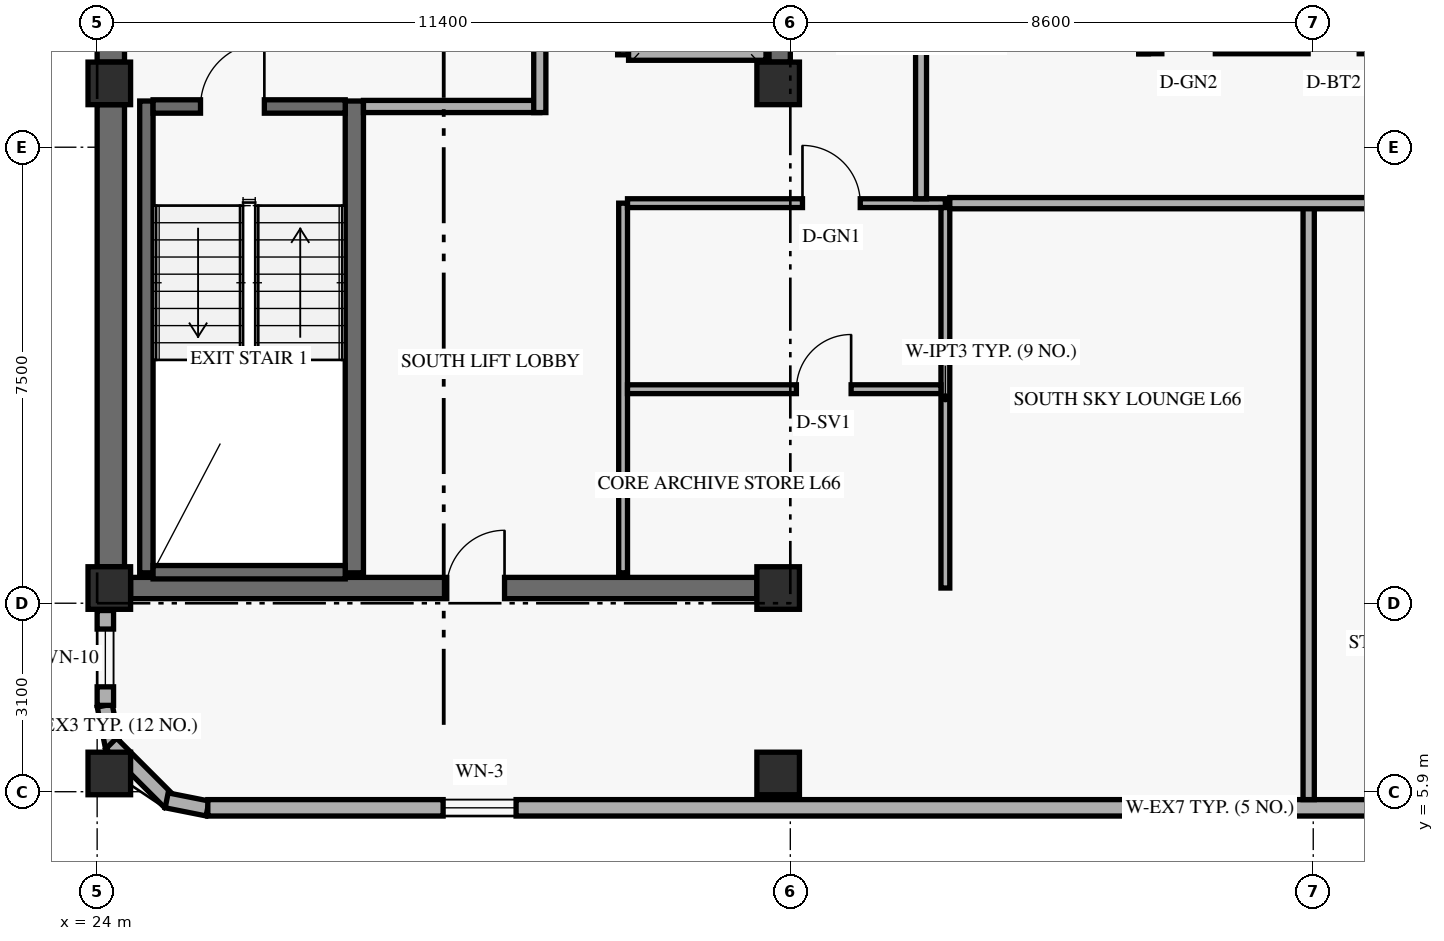
"""IFC4 building model, lengths in metres.
Left out: names, types, materials, properties, quantities, classifications, styles, units other than length and angle.
Written with IfcOpenShell. Run it as: python <this file> out.ifc"""

import sys

from ifc_helpers import new_model, si_unit, direction, frame, frame_2d, origin, origin_2d, place, context, subcontext, project, spatial, rectangle, extrude, element, fill, save


model = new_model("IFC4")
c1 = context("Model", 3, precision=1e-05, world=origin(), true_north=direction((0.0, 1.0)))
c2 = subcontext(c1, "Body", "Model", "MODEL_VIEW")
j1 = project(units=[si_unit("LENGTHUNIT", "METRE"), si_unit("PLANEANGLEUNIT", "RADIAN")], contexts=[c1])
p1 = place(None, origin())
s1 = spatial("IfcSite", under=j1, at=p1, CompositionType="ELEMENT")
p2 = place(p1, origin())
s2 = spatial("IfcBuilding", under=s1, at=p2, CompositionType="ELEMENT")
p3 = place(p2, frame((0.0, 0.0, 253.2)))
s3 = spatial("IfcBuildingStorey", under=s2, at=p3, CompositionType="ELEMENT", Elevation=253.2)
p4 = place(p3, frame((24.225, 9.6, 0.0), z_axis=(0.0, 0.0, 1.0), x_axis=(0.0, 1.0, 0.0)))
e1 = element("IfcWall", 1, at=p4, inside=s3, PredefinedType="SHEAR", context=c2, shape_type="SweptSolid", body=[
    extrude(rectangle(XDim=7.6, YDim=0.45, at=frame_2d((3.8, 0.0))), origin(), (0.0, 0.0, 1.0), 2.821),
])
p5 = place(p3, frame((24.225, 17.9, 0.0), z_axis=(0.0, 0.0, 1.0), x_axis=(0.0, 1.0, 0.0)))
e2 = element("IfcWall", 2, at=p5, inside=s3, PredefinedType="SHEAR", context=c2, shape_type="SweptSolid", body=[
    extrude(rectangle(XDim=11.95, YDim=0.45, at=frame_2d((5.975, 0.0))), origin(), (0.0, 0.0, 1.0), 2.821),
])
p6 = place(p3, frame((35.225, 17.9, 0.0), z_axis=(0.0, 0.0, 1.0), x_axis=(0.0, 1.0, 0.0)))
e3 = element("IfcWall", 3, at=p6, inside=s3, PredefinedType="SHEAR", context=c2, shape_type="SweptSolid", body=[
    extrude(rectangle(XDim=10.2, YDim=0.35, at=frame_2d((5.1, 0.0))), origin(), (0.0, 0.0, 1.0), 2.821),
])
p7 = place(p3, frame((24.55, 9.25, 0.0), z_axis=(0.0, 0.0, 1.0), x_axis=(1.0, 0.0, 0.0)))
e4 = element("IfcWall", 4, at=p7, inside=s3, PredefinedType="SHEAR", context=c2, shape_type="SweptSolid", body=[
    extrude(rectangle(XDim=10.3, YDim=0.35, at=frame_2d((5.15, 0.0))), origin(), (0.0, 0.0, 1.0), 3.36),
])
p8 = place(p7, frame((5.2, 0.0, 0.0)))
e5 = element("IfcOpeningElement", 5, at=p8, cuts=e4, PredefinedType="OPENING", context=c2, shape_type="SweptSolid", body=[
    extrude(rectangle(XDim=0.95, YDim=2.15, at=frame_2d((0.475, 1.075))), frame((0.0, 0.185, 0.0), z_axis=(0.0, -1.0, 0.0), x_axis=(1.0, 0.0, 0.0)), (0.0, 0.0, 1.0), 0.37),
])
p9 = place(p3, frame((24.81, 9.5, 0.0), z_axis=(0.0, 0.0, 1.0), x_axis=(0.0, 1.0, 0.0)))
e6 = element("IfcWall", 6, at=p9, inside=s3, PredefinedType="SHEAR", context=c2, shape_type="SweptSolid", body=[
    extrude(rectangle(XDim=7.76, YDim=0.22, at=frame_2d((3.88, 0.0))), origin(), (0.0, 0.0, 1.0), 3.36),
])
p10 = place(p3, frame((28.23, 9.5, 0.0), z_axis=(0.0, 0.0, 1.0), x_axis=(0.0, 1.0, 0.0)))
e7 = element("IfcWall", 7, at=p10, inside=s3, PredefinedType="SHEAR", context=c2, shape_type="SweptSolid", body=[
    extrude(rectangle(XDim=7.76, YDim=0.3, at=frame_2d((3.88, 0.0))), origin(), (0.0, 0.0, 1.0), 3.36),
])
p11 = place(p3, frame((24.92, 9.51, 0.0), z_axis=(0.0, 0.0, 1.0), x_axis=(1.0, 0.0, 0.0)))
e8 = element("IfcWall", 8, at=p11, inside=s3, PredefinedType="SHEAR", context=c2, shape_type="SweptSolid", body=[
    extrude(rectangle(XDim=3.16, YDim=0.22, at=frame_2d((1.58, 0.0))), origin(), (0.0, 0.0, 1.0), 3.36),
])
p12 = place(p3, frame((24.92, 17.17, 0.0), z_axis=(0.0, 0.0, 1.0), x_axis=(1.0, 0.0, 0.0)))
e9 = element("IfcWall", 9, at=p12, inside=s3, PredefinedType="SHEAR", context=c2, shape_type="SweptSolid", body=[
    extrude(rectangle(XDim=3.16, YDim=0.22, at=frame_2d((1.58, 0.0))), origin(), (0.0, 0.0, 1.0), 3.36),
])
p13 = place(p12, frame((0.78, 0.0, 0.0)))
e10 = element("IfcOpeningElement", 10, at=p13, cuts=e9, PredefinedType="OPENING", context=c2, shape_type="SweptSolid", body=[
    extrude(rectangle(XDim=1.05, YDim=2.15, at=frame_2d((0.525, 1.075))), frame((0.0, 0.12, 0.0), z_axis=(0.0, -1.0, 0.0), x_axis=(1.0, 0.0, 0.0)), (0.0, 0.0, 1.0), 0.24),
])
for number, where, z_axis, x_axis in (
    (11, (24.2, 6.2, 0.0), (0.0, 0.0, 1.0), (1.0, 0.0, 0.0)),
    (12, (24.2, 9.25, 0.0), (0.0, 0.0, 1.0), (1.0, 0.0, 0.0)),
    (13, (24.2, 17.55, 0.0), (0.0, 0.0, 1.0), (1.0, 0.0, 0.0)),
    (14, (35.2, 6.2, 0.0), (0.0, 0.0, 1.0), (1.0, 0.0, 0.0)),
    (15, (35.2, 9.25, 0.0), (0.0, 0.0, 1.0), (1.0, 0.0, 0.0)),
    (16, (35.2, 17.55, 0.0), (0.0, 0.0, 1.0), (1.0, 0.0, 0.0)),
):
    element("IfcColumn", number, at=place(p3, frame(where, z_axis=z_axis, x_axis=x_axis)), inside=s3, PredefinedType="COLUMN", context=c2, shape_type="SweptSolid", body=[
        extrude(rectangle(XDim=0.7, YDim=0.7, at=origin_2d()), origin(), (0.0, 0.0, 1.0), 3.6),
    ])
p14 = place(p3, frame((24.124, 7.316, 0.0), z_axis=(0.0, 0.0, 1.0), x_axis=(0.194952956674, -0.980812594069, 0.0)))
e17 = element("IfcWall", 17, at=p14, inside=s3, PredefinedType="SOLIDWALL", context=c2, shape_type="SweptSolid", body=[
    extrude(rectangle(XDim=0.686, YDim=0.25, at=frame_2d((0.343, 0.0))), origin(), (0.0, 0.0, 1.0), 2.803),
])
p15 = place(p3, frame((24.231, 6.694, 0.0), z_axis=(0.0, 0.0, 1.0), x_axis=(0.707106781187, -0.707106781187, 0.0)))
e18 = element("IfcWall", 18, at=p15, inside=s3, PredefinedType="SOLIDWALL", context=c2, shape_type="SweptSolid", body=[
    extrude(rectangle(XDim=1.362, YDim=0.25, at=frame_2d((0.681, 0.0))), origin(), (0.0, 0.0, 1.0), 2.803),
])
p16 = place(p3, frame((25.143, 5.758, 0.0), z_axis=(0.0, 0.0, 1.0), x_axis=(0.980812594069, -0.194952956674, 0.0)))
e19 = element("IfcWall", 19, at=p16, inside=s3, PredefinedType="SOLIDWALL", context=c2, shape_type="SweptSolid", body=[
    extrude(rectangle(XDim=0.686, YDim=0.25, at=frame_2d((0.343, 0.0))), origin(), (0.0, 0.0, 1.0), 3.36),
])
p17 = place(p3, frame((25.82, 5.635, 0.0), z_axis=(0.0, 0.0, 1.0), x_axis=(1.0, 0.0, 0.0)))
e20 = element("IfcWall", 20, at=p17, inside=s3, PredefinedType="SOLIDWALL", context=c2, shape_type="SweptSolid", body=[
    extrude(rectangle(XDim=32.96, YDim=0.27, at=frame_2d((16.48, 0.0))), origin(), (0.0, 0.0, 1.0), 3.36),
])
p18 = place(p17, frame((3.87, 0.0, 0.85)))
e21 = element("IfcOpeningElement", 21, at=p18, cuts=e20, PredefinedType="OPENING", context=c2, shape_type="SweptSolid", body=[
    extrude(rectangle(XDim=1.2, YDim=1.5, at=frame_2d((0.6, 0.75))), frame((0.0, 0.145, 0.0), z_axis=(0.0, -1.0, 0.0), x_axis=(1.0, 0.0, 0.0)), (0.0, 0.0, 1.0), 0.29),
])
p19 = place(p17, frame((19.753, 0.0, 0.85)))
e22 = element("IfcOpeningElement", 22, at=p19, cuts=e20, PredefinedType="OPENING", context=c2, shape_type="SweptSolid", body=[
    extrude(rectangle(XDim=1.2, YDim=1.5, at=frame_2d((0.6, 0.75))), frame((0.0, 0.145, 0.0), z_axis=(0.0, -1.0, 0.0), x_axis=(1.0, 0.0, 0.0)), (0.0, 0.0, 1.0), 0.29),
])
p20 = place(p17, frame((24.405, 0.0, 0.85)))
e23 = element("IfcOpeningElement", 23, at=p20, cuts=e20, PredefinedType="OPENING", context=c2, shape_type="SweptSolid", body=[
    extrude(rectangle(XDim=1.2, YDim=1.5, at=frame_2d((0.6, 0.75))), frame((0.0, 0.145, 0.0), z_axis=(0.0, -1.0, 0.0), x_axis=(1.0, 0.0, 0.0)), (0.0, 0.0, 1.0), 0.29),
])
p21 = place(p17, frame((27.958, 0.0, 0.85)))
e24 = element("IfcOpeningElement", 24, at=p21, cuts=e20, PredefinedType="OPENING", context=c2, shape_type="SweptSolid", body=[
    extrude(rectangle(XDim=1.2, YDim=1.5, at=frame_2d((0.6, 0.75))), frame((0.0, 0.145, 0.0), z_axis=(0.0, -1.0, 0.0), x_axis=(1.0, 0.0, 0.0)), (0.0, 0.0, 1.0), 0.29),
])
p22 = place(p3, frame((24.135, 7.32, 0.0), z_axis=(0.0, 0.0, 1.0), x_axis=(0.0, 1.0, 0.0)))
e25 = element("IfcWall", 25, at=p22, inside=s3, PredefinedType="SOLIDWALL", context=c2, shape_type="SweptSolid", body=[
    extrude(rectangle(XDim=1.56, YDim=0.27, at=frame_2d((0.78, 0.0))), origin(), (0.0, 0.0, 1.0), 2.803),
])
p23 = place(p22, frame((0.305, 0.0, 0.85)))
e26 = element("IfcOpeningElement", 26, at=p23, cuts=e25, PredefinedType="OPENING", context=c2, shape_type="SweptSolid", body=[
    extrude(rectangle(XDim=0.95, YDim=1.5, at=frame_2d((0.475, 0.75))), frame((0.0, 0.145, 0.0), z_axis=(0.0, -1.0, 0.0), x_axis=(1.0, 0.0, 0.0)), (0.0, 0.0, 1.0), 0.29),
])
p24 = place(p3, frame((28.38, 17.17, 0.0), z_axis=(0.0, 0.0, 1.0), x_axis=(1.0, 0.0, 0.0)))
e27 = element("IfcWall", 27, at=p24, inside=s3, PredefinedType="STANDARD", context=c2, shape_type="SweptSolid", body=[
    extrude(rectangle(XDim=2.9, YDim=0.2, at=frame_2d((1.45, 0.0))), origin(), (0.0, 0.0, 1.0), 3.36),
])
p25 = place(p3, frame((31.28, 17.07, 0.0), z_axis=(0.0, 0.0, 1.0), x_axis=(0.0, 1.0, 0.0)))
e28 = element("IfcWall", 28, at=p25, inside=s3, PredefinedType="STANDARD", context=c2, shape_type="SweptSolid", body=[
    extrude(rectangle(XDim=3.92, YDim=0.2, at=frame_2d((1.96, 0.0))), origin(), (0.0, 0.0, 1.0), 2.803),
])
p26 = place(p25, frame((1.35, 0.0, 0.0)))
e29 = element("IfcOpeningElement", 29, at=p26, cuts=e28, PredefinedType="OPENING", context=c2, shape_type="SweptSolid", body=[
    extrude(rectangle(XDim=1.2, YDim=2.15, at=frame_2d((0.6, 1.075))), frame((0.0, 0.11, 0.0), z_axis=(0.0, -1.0, 0.0), x_axis=(1.0, 0.0, 0.0)), (0.0, 0.0, 1.0), 0.22),
])
p27 = place(p3, frame((32.65, 18.02, 0.0), z_axis=(0.0, 0.0, 1.0), x_axis=(0.0, 1.0, 0.0)))
e30 = element("IfcWall", 30, at=p27, inside=s3, PredefinedType="STANDARD", context=c2, shape_type="SweptSolid", body=[
    extrude(rectangle(XDim=10.06, YDim=0.18, at=frame_2d((5.03, 0.0))), origin(), (0.0, 0.0, 1.0), 3.36),
])
p28 = place(p27, frame((0.48, 0.0, 0.0)))
e31 = element("IfcOpeningElement", 31, at=p28, cuts=e30, PredefinedType="OPENING", context=c2, shape_type="SweptSolid", body=[
    extrude(rectangle(XDim=1.05, YDim=2.2, at=frame_2d((0.525, 1.1))), frame((0.0, 0.1, 0.0), z_axis=(0.0, -1.0, 0.0), x_axis=(1.0, 0.0, 0.0)), (0.0, 0.0, 1.0), 0.2),
])
p29 = place(p27, frame((2.48, 0.0, 0.0)))
e32 = element("IfcOpeningElement", 32, at=p29, cuts=e30, PredefinedType="OPENING", context=c2, shape_type="SweptSolid", body=[
    extrude(rectangle(XDim=1.05, YDim=2.2, at=frame_2d((0.525, 1.1))), frame((0.0, 0.1, 0.0), z_axis=(0.0, -1.0, 0.0), x_axis=(1.0, 0.0, 0.0)), (0.0, 0.0, 1.0), 0.2),
])
p30 = place(p27, frame((4.48, 0.0, 0.0)))
e33 = element("IfcOpeningElement", 33, at=p30, cuts=e30, PredefinedType="OPENING", context=c2, shape_type="SweptSolid", body=[
    extrude(rectangle(XDim=1.05, YDim=2.2, at=frame_2d((0.525, 1.1))), frame((0.0, 0.1, 0.0), z_axis=(0.0, -1.0, 0.0), x_axis=(1.0, 0.0, 0.0)), (0.0, 0.0, 1.0), 0.2),
])
p31 = place(p3, frame((32.74, 18.02, 0.0), z_axis=(0.0, 0.0, 1.0), x_axis=(1.0, 0.0, 0.0)))
e34 = element("IfcWall", 34, at=p31, inside=s3, PredefinedType="STANDARD", context=c2, shape_type="SweptSolid", body=[
    extrude(rectangle(XDim=2.26, YDim=0.18, at=frame_2d((1.13, 0.0))), origin(), (0.0, 0.0, 1.0), 3.36),
])
p32 = place(p3, frame((32.65, 9.5, 0.0), z_axis=(0.0, 0.0, 1.0), x_axis=(0.0, 1.0, 0.0)))
e35 = element("IfcWall", 35, at=p32, inside=s3, PredefinedType="PARTITIONING", context=c2, shape_type="SweptSolid", body=[
    extrude(rectangle(XDim=6.08, YDim=0.145, at=frame_2d((3.04, 0.0))), origin(), (0.0, 0.0, 1.0), 3.36),
])
p33 = place(p3, frame((32.722, 15.58, 0.0), z_axis=(0.0, 0.0, 1.0), x_axis=(1.0, 0.0, 0.0)))
e36 = element("IfcWall", 36, at=p33, inside=s3, PredefinedType="PARTITIONING", context=c2, shape_type="SweptSolid", body=[
    extrude(rectangle(XDim=5.228, YDim=0.145, at=frame_2d((2.614, 0.0))), origin(), (0.0, 0.0, 1.0), 2.803),
])
p34 = place(p33, frame((2.877, 0.0, 0.0)))
e37 = element("IfcOpeningElement", 37, at=p34, cuts=e36, PredefinedType="OPENING", context=c2, shape_type="SweptSolid", body=[
    extrude(rectangle(XDim=0.95, YDim=2.15, at=frame_2d((0.475, 1.075))), frame((0.0, 0.083, 0.0), z_axis=(0.0, -1.0, 0.0), x_axis=(1.0, 0.0, 0.0)), (0.0, 0.0, 1.0), 0.165),
])
p35 = place(p3, frame((37.95, 9.25, 0.0), z_axis=(0.0, 0.0, 1.0), x_axis=(0.0, 1.0, 0.0)))
e38 = element("IfcWall", 38, at=p35, inside=s3, PredefinedType="PARTITIONING", context=c2, shape_type="SweptSolid", body=[
    extrude(rectangle(XDim=6.258, YDim=0.145, at=frame_2d((3.129, 0.0))), origin(), (0.0, 0.0, 1.0), 2.803),
])
p36 = place(p3, frame((32.722, 12.52, 0.0), z_axis=(0.0, 0.0, 1.0), x_axis=(1.0, 0.0, 0.0)))
e39 = element("IfcWall", 39, at=p36, inside=s3, PredefinedType="PARTITIONING", context=c2, shape_type="SweptSolid", body=[
    extrude(rectangle(XDim=5.155, YDim=0.145, at=frame_2d((2.578, 0.0))), origin(), (0.0, 0.0, 1.0), 2.803),
])
p37 = place(p36, frame((2.778, 0.0, 0.0)))
e40 = element("IfcOpeningElement", 40, at=p37, cuts=e39, PredefinedType="OPENING", context=c2, shape_type="SweptSolid", body=[
    extrude(rectangle(XDim=0.9, YDim=2.1, at=frame_2d((0.45, 1.05))), frame((0.0, 0.083, 0.0), z_axis=(0.0, -1.0, 0.0), x_axis=(1.0, 0.0, 0.0)), (0.0, 0.0, 1.0), 0.165),
])
p38 = place(p3, frame((37.55, 15.653, 0.0), z_axis=(0.0, 0.0, 1.0), x_axis=(0.0, 1.0, 0.0)))
e41 = element("IfcWall", 41, at=p38, inside=s3, PredefinedType="STANDARD", context=c2, shape_type="SweptSolid", body=[
    extrude(rectangle(XDim=5.147, YDim=0.18, at=frame_2d((2.574, 0.0))), origin(), (0.0, 0.0, 1.0), 2.803),
])
p39 = place(p3, frame((43.925, 5.77, 0.0), z_axis=(0.0, 0.0, 1.0), x_axis=(0.0, 1.0, 0.0)))
e42 = element("IfcWall", 42, at=p39, inside=s3, PredefinedType="PARTITIONING", context=c2, shape_type="SweptSolid", body=[
    extrude(rectangle(XDim=9.81, YDim=0.185, at=frame_2d((4.905, 0.0))), origin(), (0.0, 0.0, 1.0), 2.803),
])
p40 = place(p3, frame((38.022, 15.58, 0.0), z_axis=(0.0, 0.0, 1.0), x_axis=(1.0, 0.0, 0.0)))
e43 = element("IfcWall", 43, at=p40, inside=s3, PredefinedType="PARTITIONING", context=c2, shape_type="SweptSolid", body=[
    extrude(rectangle(XDim=11.788, YDim=0.185, at=frame_2d((5.894, 0.0))), origin(), (0.0, 0.0, 1.0), 2.803),
])
p41 = place(p3, frame((41.13, 18.117, 0.0), z_axis=(0.0, 0.0, 1.0), x_axis=(1.0, 0.0, 0.0)))
e44 = element("IfcWall", 44, at=p41, inside=s3, PredefinedType="PLUMBINGWALL", context=c2, shape_type="SweptSolid", body=[
    extrude(rectangle(XDim=4.71, YDim=0.16, at=frame_2d((2.355, 0.0))), origin(), (0.0, 0.0, 1.0), 3.36),
])
p42 = place(p41, frame((0.38, 0.0, 0.0)))
e45 = element("IfcOpeningElement", 45, at=p42, cuts=e44, PredefinedType="OPENING", context=c2, shape_type="SweptSolid", body=[
    extrude(rectangle(XDim=0.88, YDim=2.12, at=frame_2d((0.44, 1.06))), frame((0.0, 0.09, 0.0), z_axis=(0.0, -1.0, 0.0), x_axis=(1.0, 0.0, 0.0)), (0.0, 0.0, 1.0), 0.18),
])
p43 = place(p41, frame((2.786, 0.0, 0.0)))
e46 = element("IfcOpeningElement", 46, at=p43, cuts=e44, PredefinedType="OPENING", context=c2, shape_type="SweptSolid", body=[
    extrude(rectangle(XDim=0.84, YDim=2.12, at=frame_2d((0.42, 1.06))), frame((0.0, 0.09, 0.0), z_axis=(0.0, -1.0, 0.0), x_axis=(1.0, 0.0, 0.0)), (0.0, 0.0, 1.0), 0.18),
])
p44 = place(p3, frame((41.21, 18.038, 0.0), z_axis=(0.0, 0.0, 1.0), x_axis=(0.0, 1.0, 0.0)))
e47 = element("IfcWall", 47, at=p44, inside=s3, PredefinedType="PLUMBINGWALL", context=c2, shape_type="SweptSolid", body=[
    extrude(rectangle(XDim=2.672, YDim=0.16, at=frame_2d((1.336, 0.0))), origin(), (0.0, 0.0, 1.0), 3.36),
])
p45 = place(p18, origin())
e48 = element("IfcWindow", 48, at=p45, inside=s3, PartitioningType="SINGLE_PANEL", PredefinedType="WINDOW", context=c2, shape_type="SweptSolid", body=[
    extrude(rectangle(XDim=1.2, YDim=1.5, at=frame_2d((0.6, 0.75))), frame((0.0, 0.03, 0.0), z_axis=(0.0, -1.0, 0.0), x_axis=(1.0, 0.0, 0.0)), (0.0, 0.0, 1.0), 0.06),
])
fill(e21, e48)
p46 = place(p23, origin())
e49 = element("IfcWindow", 49, at=p46, inside=s3, PartitioningType="SINGLE_PANEL", PredefinedType="WINDOW", context=c2, shape_type="SweptSolid", body=[
    extrude(rectangle(XDim=0.95, YDim=1.5, at=frame_2d((0.475, 0.75))), frame((0.0, 0.03, 0.0), z_axis=(0.0, -1.0, 0.0), x_axis=(1.0, 0.0, 0.0)), (0.0, 0.0, 1.0), 0.06),
])
fill(e26, e49)
p47 = place(p13, frame((1.05, 0.0, 0.0), z_axis=(0.0, 0.0, 1.0), x_axis=(-1.0, 0.0, 0.0)))
e50 = element("IfcDoor", 50, at=p47, inside=s3, OperationType="SINGLE_SWING_LEFT", PredefinedType="DOOR", context=c2, shape_type="SweptSolid", body=[
    extrude(rectangle(XDim=1.05, YDim=2.15, at=frame_2d((0.525, 1.075))), frame((0.0, 0.025, 0.0), z_axis=(0.0, -1.0, 0.0), x_axis=(1.0, 0.0, 0.0)), (0.0, 0.0, 1.0), 0.05),
])
fill(e10, e50)
p48 = place(p34, origin())
e51 = element("IfcDoor", 51, at=p48, inside=s3, OperationType="SINGLE_SWING_LEFT", PredefinedType="DOOR", context=c2, shape_type="SweptSolid", body=[
    extrude(rectangle(XDim=0.95, YDim=2.15, at=frame_2d((0.475, 1.075))), frame((0.0, 0.025, 0.0), z_axis=(0.0, -1.0, 0.0), x_axis=(1.0, 0.0, 0.0)), (0.0, 0.0, 1.0), 0.05),
])
fill(e37, e51)
p49 = place(p37, origin())
e52 = element("IfcDoor", 52, at=p49, inside=s3, OperationType="SINGLE_SWING_RIGHT", PredefinedType="DOOR", context=c2, shape_type="SweptSolid", body=[
    extrude(rectangle(XDim=0.9, YDim=2.1, at=frame_2d((0.45, 1.05))), frame((0.0, 0.025, 0.0), z_axis=(0.0, -1.0, 0.0), x_axis=(1.0, 0.0, 0.0)), (0.0, 0.0, 1.0), 0.05),
])
fill(e40, e52)
p50 = place(p8, frame((0.95, 0.0, 0.0), z_axis=(0.0, 0.0, 1.0), x_axis=(-1.0, 0.0, 0.0)))
e53 = element("IfcDoor", 53, at=p50, inside=s3, OperationType="SINGLE_SWING_LEFT", PredefinedType="DOOR", context=c2, shape_type="SweptSolid", body=[
    extrude(rectangle(XDim=0.95, YDim=2.15, at=frame_2d((0.475, 1.075))), frame((0.0, 0.025, 0.0), z_axis=(0.0, -1.0, 0.0), x_axis=(1.0, 0.0, 0.0)), (0.0, 0.0, 1.0), 0.05),
])
fill(e5, e53)
save(model, sys.argv[1])
